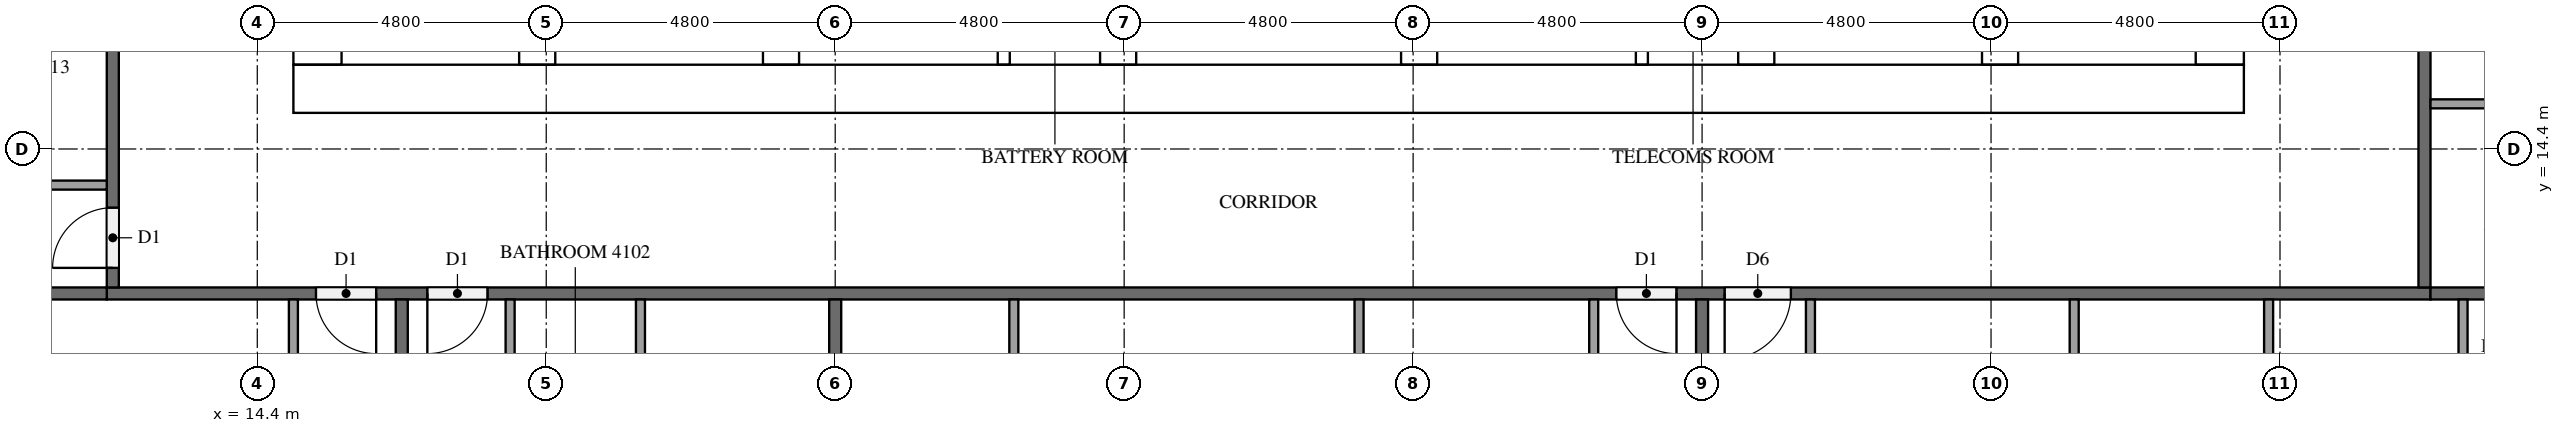
"""IFC4 building model, lengths in metres.
Left out: names, types, materials, properties, quantities, classifications, styles, units other than length and angle.
Written with IfcOpenShell. Run it as: python <this file> out.ifc"""

import sys

from ifc_helpers import new_model, si_unit, direction, frame, frame_2d, origin, place, context, subcontext, project, spatial, rectangle, extrude, element, fill, save


model = new_model("IFC4")
c1 = context("Model", 3, precision=1e-05, world=origin(), true_north=direction((0.0, 1.0)))
c2 = subcontext(c1, "Body", "Model", "MODEL_VIEW")
j1 = project(units=[si_unit("LENGTHUNIT", "METRE"), si_unit("PLANEANGLEUNIT", "RADIAN")], contexts=[c1])
p1 = place(None, origin())
s1 = spatial("IfcSite", under=j1, at=p1, CompositionType="ELEMENT")
p2 = place(p1, origin())
s2 = spatial("IfcBuilding", under=s1, at=p2, CompositionType="ELEMENT")
p3 = place(p2, frame((0.0, 0.0, 159.5)))
s3 = spatial("IfcBuildingStorey", under=s2, at=p3, CompositionType="ELEMENT", Elevation=159.5)
p4 = place(p3, frame((15.0, 15.4, 0.0), z_axis=(0.0, 0.0, 1.0), x_axis=(1.0, 0.0, 0.0)))
e1 = element("IfcWall", 1, at=p4, inside=s3, PredefinedType="SHEAR", context=c2, shape_type="SweptSolid", body=[
    extrude(rectangle(XDim=32.4, YDim=0.8, at=frame_2d((16.2, 0.0))), origin(), (0.0, 0.0, 1.0), 3.2),
])
p5 = place(p4, frame((15.3, 0.0, 0.0)))
e2 = element("IfcOpeningElement", 2, at=p5, cuts=e1, PredefinedType="OPENING", context=c2, shape_type="SweptSolid", body=[
    extrude(rectangle(XDim=1.8, YDim=2.1, at=frame_2d((0.9, 1.05))), frame((0.0, 0.41, 0.0), z_axis=(0.0, -1.0, 0.0), x_axis=(1.0, 0.0, 0.0)), (0.0, 0.0, 1.0), 0.82),
])
p6 = place(p3, frame((15.4, 15.8, 0.0), z_axis=(0.0, 0.0, 1.0), x_axis=(0.0, 1.0, 0.0)))
e3 = element("IfcWall", 3, at=p6, inside=s3, PredefinedType="SHEAR", context=c2, shape_type="SweptSolid", body=[
    extrude(rectangle(XDim=21.2, YDim=0.8, at=frame_2d((10.6, 0.0))), origin(), (0.0, 0.0, 1.0), 3.2),
])
p7 = place(p6, frame((4.96, 0.0, 0.0)))
e4 = element("IfcOpeningElement", 4, at=p7, cuts=e3, PredefinedType="OPENING", context=c2, shape_type="SweptSolid", body=[
    extrude(rectangle(XDim=1.2, YDim=2.1, at=frame_2d((0.6, 1.05))), frame((0.0, 0.41, 0.0), z_axis=(0.0, -1.0, 0.0), x_axis=(1.0, 0.0, 0.0)), (0.0, 0.0, 1.0), 0.82),
])
p8 = place(p3, frame((47.0, 15.8, 0.0), z_axis=(0.0, 0.0, 1.0), x_axis=(0.0, 1.0, 0.0)))
e5 = element("IfcWall", 5, at=p8, inside=s3, PredefinedType="SHEAR", context=c2, shape_type="SweptSolid", body=[
    extrude(rectangle(XDim=21.2, YDim=0.8, at=frame_2d((10.6, 0.0))), origin(), (0.0, 0.0, 1.0), 3.2),
])
p9 = place(p8, frame((10.3, 0.0, 0.0)))
e6 = element("IfcOpeningElement", 6, at=p9, cuts=e5, PredefinedType="OPENING", context=c2, shape_type="SweptSolid", body=[
    extrude(rectangle(XDim=1.2, YDim=2.1, at=frame_2d((0.6, 1.05))), frame((0.0, 0.41, 0.0), z_axis=(0.0, -1.0, 0.0), x_axis=(1.0, 0.0, 0.0)), (0.0, 0.0, 1.0), 0.82),
])
p10 = place(p3, frame((19.05, 15.8, 0.0), z_axis=(0.0, 0.0, 1.0), x_axis=(0.0, 1.0, 0.0)))
e7 = element("IfcWall", 7, at=p10, inside=s3, PredefinedType="SHEAR", context=c2, shape_type="SweptSolid", body=[
    extrude(rectangle(XDim=15.15, YDim=0.6, at=frame_2d((7.575, 0.0))), origin(), (0.0, 0.0, 1.0), 3.2),
])
p11 = place(p10, frame((9.65, 0.0, 0.0)))
e8 = element("IfcOpeningElement", 8, at=p11, cuts=e7, PredefinedType="OPENING", context=c2, shape_type="SweptSolid", body=[
    extrude(rectangle(XDim=1.1, YDim=2.1, at=frame_2d((0.55, 1.05))), frame((0.0, 0.31, 0.0), z_axis=(0.0, -1.0, 0.0), x_axis=(1.0, 0.0, 0.0)), (0.0, 0.0, 1.0), 0.62),
])
p12 = place(p10, frame((13.15, 0.0, 0.0)))
e9 = element("IfcOpeningElement", 9, at=p12, cuts=e7, PredefinedType="OPENING", context=c2, shape_type="SweptSolid", body=[
    extrude(rectangle(XDim=1.1, YDim=2.1, at=frame_2d((0.55, 1.05))), frame((0.0, 0.31, 0.0), z_axis=(0.0, -1.0, 0.0), x_axis=(1.0, 0.0, 0.0)), (0.0, 0.0, 1.0), 0.62),
])
p13 = place(p10, frame((0.4, 0.0, 0.0)))
e10 = element("IfcOpeningElement", 10, at=p13, cuts=e7, PredefinedType="OPENING", context=c2, shape_type="SweptSolid", body=[
    extrude(rectangle(XDim=1.2, YDim=2.1, at=frame_2d((0.6, 1.05))), frame((0.0, 0.31, 0.0), z_axis=(0.0, -1.0, 0.0), x_axis=(1.0, 0.0, 0.0)), (0.0, 0.0, 1.0), 0.62),
])
p14 = place(p3, frame((23.1, 15.8, 0.0), z_axis=(0.0, 0.0, 1.0), x_axis=(0.0, 1.0, 0.0)))
e11 = element("IfcWall", 11, at=p14, inside=s3, PredefinedType="SHEAR", context=c2, shape_type="SweptSolid", body=[
    extrude(rectangle(XDim=21.2, YDim=0.6, at=frame_2d((10.6, 0.0))), origin(), (0.0, 0.0, 1.0), 3.2),
])
p15 = place(p3, frame((39.3, 15.8, 0.0), z_axis=(0.0, 0.0, 1.0), x_axis=(0.0, 1.0, 0.0)))
e12 = element("IfcWall", 12, at=p15, inside=s3, PredefinedType="SHEAR", context=c2, shape_type="SweptSolid", body=[
    extrude(rectangle(XDim=8.45, YDim=0.6, at=frame_2d((4.225, 0.0))), origin(), (0.0, 0.0, 1.0), 3.2),
])
p16 = place(p3, frame((43.35, 15.8, 0.0), z_axis=(0.0, 0.0, 1.0), x_axis=(0.0, 1.0, 0.0)))
e13 = element("IfcWall", 13, at=p16, inside=s3, PredefinedType="SHEAR", context=c2, shape_type="SweptSolid", body=[
    extrude(rectangle(XDim=8.45, YDim=0.6, at=frame_2d((4.225, 0.0))), origin(), (0.0, 0.0, 1.0), 3.2),
])
p17 = place(p16, frame((0.4, 0.0, 0.0)))
e14 = element("IfcOpeningElement", 14, at=p17, cuts=e13, PredefinedType="OPENING", context=c2, shape_type="SweptSolid", body=[
    extrude(rectangle(XDim=1.2, YDim=2.1, at=frame_2d((0.6, 1.05))), frame((0.0, 0.31, 0.0), z_axis=(0.0, -1.0, 0.0), x_axis=(1.0, 0.0, 0.0)), (0.0, 0.0, 1.0), 0.62),
])
for number, where, z_axis, x_axis in (
    (15, (28.7, 15.8, 0.0), (0.0, 0.0, 1.0), (0.0, 1.0, 0.0)),
    (16, (33.7, 15.8, 0.0), (0.0, 0.0, 1.0), (0.0, 1.0, 0.0)),
):
    element("IfcWall", number, at=place(p3, frame(where, z_axis=z_axis, x_axis=x_axis)), inside=s3, PredefinedType="SHEAR", context=c2, shape_type="SweptSolid", body=[
        extrude(rectangle(XDim=2.65, YDim=0.6, at=frame_2d((1.325, 0.0))), origin(), (0.0, 0.0, 1.0), 3.2),
    ])
for number, where, z_axis, x_axis in (
    (17, (26.8, 15.8, 0.0), (0.0, 0.0, 1.0), (0.0, 1.0, 0.0)),
    (18, (37.4, 15.8, 0.0), (0.0, 0.0, 1.0), (0.0, 1.0, 0.0)),
):
    element("IfcWall", number, at=place(p3, frame(where, z_axis=z_axis, x_axis=x_axis)), inside=s3, PredefinedType="PARTITIONING", context=c2, shape_type="SweptSolid", body=[
        extrude(rectangle(XDim=2.65, YDim=0.2, at=frame_2d((1.325, 0.0))), origin(), (0.0, 0.0, 1.0), 3.2),
    ])
p18 = place(p3, frame((50.5, 12.0, 0.0), z_axis=(0.0, 0.0, 1.0), x_axis=(-1.0, 0.0, 0.0)))
e19 = element("IfcWall", 19, at=p18, inside=s3, PredefinedType="PARTITIONING", context=c2, shape_type="SweptSolid", body=[
    extrude(rectangle(XDim=38.6, YDim=0.2, at=frame_2d((19.3, 0.0))), origin(), (0.0, 0.0, 1.0), 3.2),
])
p19 = place(p18, frame((34.125, 0.0, 0.0)))
e20 = element("IfcOpeningElement", 20, at=p19, cuts=e19, PredefinedType="OPENING", context=c2, shape_type="SweptSolid", body=[
    extrude(rectangle(XDim=1.0, YDim=2.1, at=frame_2d((0.5, 1.05))), frame((0.0, 0.11, 0.0), z_axis=(0.0, -1.0, 0.0), x_axis=(1.0, 0.0, 0.0)), (0.0, 0.0, 1.0), 0.22),
])
p20 = place(p18, frame((32.275, 0.0, 0.0)))
e21 = element("IfcOpeningElement", 21, at=p20, cuts=e19, PredefinedType="OPENING", context=c2, shape_type="SweptSolid", body=[
    extrude(rectangle(XDim=1.0, YDim=2.1, at=frame_2d((0.5, 1.05))), frame((0.0, 0.11, 0.0), z_axis=(0.0, -1.0, 0.0), x_axis=(1.0, 0.0, 0.0)), (0.0, 0.0, 1.0), 0.22),
])
p21 = place(p18, frame((12.525, 0.0, 0.0)))
e22 = element("IfcOpeningElement", 22, at=p21, cuts=e19, PredefinedType="OPENING", context=c2, shape_type="SweptSolid", body=[
    extrude(rectangle(XDim=1.0, YDim=2.1, at=frame_2d((0.5, 1.05))), frame((0.0, 0.11, 0.0), z_axis=(0.0, -1.0, 0.0), x_axis=(1.0, 0.0, 0.0)), (0.0, 0.0, 1.0), 0.22),
])
p22 = place(p18, frame((10.625, 0.0, 0.0)))
e23 = element("IfcOpeningElement", 23, at=p22, cuts=e19, PredefinedType="OPENING", context=c2, shape_type="SweptSolid", body=[
    extrude(rectangle(XDim=1.1, YDim=2.1, at=frame_2d((0.55, 1.05))), frame((0.0, 0.11, 0.0), z_axis=(0.0, -1.0, 0.0), x_axis=(1.0, 0.0, 0.0)), (0.0, 0.0, 1.0), 0.22),
])
p23 = place(p3, frame((50.4, 40.7, 0.0), z_axis=(0.0, 0.0, 1.0), x_axis=(0.0, -1.0, 0.0)))
e24 = element("IfcWall", 24, at=p23, inside=s3, PredefinedType="PARTITIONING", context=c2, shape_type="SweptSolid", body=[
    extrude(rectangle(XDim=28.6, YDim=0.2, at=frame_2d((14.3, 0.0))), origin(), (0.0, 0.0, 1.0), 3.2),
])
p24 = place(p23, frame((19.525, 0.0, 0.0)))
e25 = element("IfcOpeningElement", 25, at=p24, cuts=e24, PredefinedType="OPENING", context=c2, shape_type="SweptSolid", body=[
    extrude(rectangle(XDim=1.0, YDim=2.1, at=frame_2d((0.5, 1.05))), frame((0.0, 0.11, 0.0), z_axis=(0.0, -1.0, 0.0), x_axis=(1.0, 0.0, 0.0)), (0.0, 0.0, 1.0), 0.22),
])
p25 = place(p23, frame((17.675, 0.0, 0.0)))
e26 = element("IfcOpeningElement", 26, at=p25, cuts=e24, PredefinedType="OPENING", context=c2, shape_type="SweptSolid", body=[
    extrude(rectangle(XDim=1.0, YDim=2.1, at=frame_2d((0.5, 1.05))), frame((0.0, 0.11, 0.0), z_axis=(0.0, -1.0, 0.0), x_axis=(1.0, 0.0, 0.0)), (0.0, 0.0, 1.0), 0.22),
])
p26 = place(p23, frame((8.075, 0.0, 0.0)))
e27 = element("IfcOpeningElement", 27, at=p26, cuts=e24, PredefinedType="OPENING", context=c2, shape_type="SweptSolid", body=[
    extrude(rectangle(XDim=1.0, YDim=2.1, at=frame_2d((0.5, 1.05))), frame((0.0, 0.11, 0.0), z_axis=(0.0, -1.0, 0.0), x_axis=(1.0, 0.0, 0.0)), (0.0, 0.0, 1.0), 0.22),
])
p27 = place(p3, frame((12.0, 12.1, 0.0), z_axis=(0.0, 0.0, 1.0), x_axis=(0.0, 1.0, 0.0)))
e28 = element("IfcWall", 28, at=p27, inside=s3, PredefinedType="PARTITIONING", context=c2, shape_type="SweptSolid", body=[
    extrude(rectangle(XDim=28.6, YDim=0.2, at=frame_2d((14.3, 0.0))), origin(), (0.0, 0.0, 1.0), 3.2),
])
p28 = place(p27, frame((24.325, 0.0, 0.0)))
e29 = element("IfcOpeningElement", 29, at=p28, cuts=e28, PredefinedType="OPENING", context=c2, shape_type="SweptSolid", body=[
    extrude(rectangle(XDim=1.0, YDim=2.1, at=frame_2d((0.5, 1.05))), frame((0.0, 0.11, 0.0), z_axis=(0.0, -1.0, 0.0), x_axis=(1.0, 0.0, 0.0)), (0.0, 0.0, 1.0), 0.22),
])
p29 = place(p27, frame((22.475, 0.0, 0.0)))
e30 = element("IfcOpeningElement", 30, at=p29, cuts=e28, PredefinedType="OPENING", context=c2, shape_type="SweptSolid", body=[
    extrude(rectangle(XDim=1.0, YDim=2.1, at=frame_2d((0.5, 1.05))), frame((0.0, 0.11, 0.0), z_axis=(0.0, -1.0, 0.0), x_axis=(1.0, 0.0, 0.0)), (0.0, 0.0, 1.0), 0.22),
])
p30 = place(p27, frame((0.325, 0.0, 0.0)))
e31 = element("IfcOpeningElement", 31, at=p30, cuts=e28, PredefinedType="OPENING", context=c2, shape_type="SweptSolid", body=[
    extrude(rectangle(XDim=1.0, YDim=2.1, at=frame_2d((0.5, 1.05))), frame((0.0, 0.11, 0.0), z_axis=(0.0, -1.0, 0.0), x_axis=(1.0, 0.0, 0.0)), (0.0, 0.0, 1.0), 0.22),
])
for number, where, z_axis, x_axis in (
    (32, (16.8, 11.9, 0.0), (0.0, 0.0, 1.0), (0.0, -1.0, 0.0)),
    (33, (0.1, 12.0, 0.0), (0.0, 0.0, 1.0), (1.0, 0.0, 0.0)),
):
    element("IfcWall", number, at=place(p3, frame(where, z_axis=z_axis, x_axis=x_axis)), inside=s3, PredefinedType="PARTITIONING", context=c2, shape_type="SweptSolid", body=[
        extrude(rectangle(XDim=11.8, YDim=0.2, at=frame_2d((5.9, 0.0))), origin(), (0.0, 0.0, 1.0), 3.2),
    ])
p31 = place(p3, frame((24.0, 11.9, 0.0), z_axis=(0.0, 0.0, 1.0), x_axis=(0.0, -1.0, 0.0)))
e34 = element("IfcWall", 34, at=p31, inside=s3, PredefinedType="PARTITIONING", context=c2, shape_type="SweptSolid", body=[
    extrude(rectangle(XDim=11.525, YDim=0.2, at=frame_2d((5.762, 0.0))), origin(), (0.0, 0.0, 1.0), 3.2),
])
p32 = place(p3, frame((38.4, 11.9, 0.0), z_axis=(0.0, 0.0, 1.0), x_axis=(0.0, -1.0, 0.0)))
e35 = element("IfcWall", 35, at=p32, inside=s3, PredefinedType="PARTITIONING", context=c2, shape_type="SweptSolid", body=[
    extrude(rectangle(XDim=11.8, YDim=0.2, at=frame_2d((5.9, 0.0))), origin(), (0.0, 0.0, 1.0), 3.2),
])
p33 = place(p3, frame((50.5, 12.0, 0.0), z_axis=(0.0, 0.0, 1.0), x_axis=(1.0, 0.0, 0.0)))
e36 = element("IfcWall", 36, at=p33, inside=s3, PredefinedType="PARTITIONING", context=c2, shape_type="SweptSolid", body=[
    extrude(rectangle(XDim=7.0, YDim=0.2, at=frame_2d((3.5, 0.0))), origin(), (0.0, 0.0, 1.0), 3.2),
])
p34 = place(p3, frame((15.0, 11.9, 0.0), z_axis=(0.0, 0.0, 1.0), x_axis=(0.0, -1.0, 0.0)))
e37 = element("IfcWall", 37, at=p34, inside=s3, PredefinedType="PARTITIONING", context=c2, shape_type="SweptSolid", body=[
    extrude(rectangle(XDim=3.125, YDim=0.15, at=frame_2d((1.562, 0.0))), origin(), (0.0, 0.0, 1.0), 3.2),
])
p35 = place(p3, frame((20.765, 11.9, 0.0), z_axis=(0.0, 0.0, 1.0), x_axis=(0.0, -1.0, 0.0)))
e38 = element("IfcWall", 38, at=p35, inside=s3, PredefinedType="PARTITIONING", context=c2, shape_type="SweptSolid", body=[
    extrude(rectangle(XDim=2.975, YDim=0.15, at=frame_2d((1.487, 0.0))), origin(), (0.0, 0.0, 1.0), 3.2),
])
for number, where, z_axis, x_axis in (
    (39, (18.6, 11.9, 0.0), (0.0, 0.0, 1.0), (0.0, -1.0, 0.0)),
    (40, (32.702, 11.9, 0.0), (0.0, 0.0, 1.0), (0.0, -1.0, 0.0)),
    (41, (26.967, 11.9, 0.0), (0.0, 0.0, 1.0), (0.0, -1.0, 0.0)),
):
    element("IfcWall", number, at=place(p3, frame(where, z_axis=z_axis, x_axis=x_axis)), inside=s3, PredefinedType="PARTITIONING", context=c2, shape_type="SweptSolid", body=[
        extrude(rectangle(XDim=3.125, YDim=0.15, at=frame_2d((1.562, 0.0))), origin(), (0.0, 0.0, 1.0), 3.2),
    ])
p36 = place(p3, frame((36.6, 11.9, 0.0), z_axis=(0.0, 0.0, 1.0), x_axis=(0.0, -1.0, 0.0)))
e42 = element("IfcWall", 42, at=p36, inside=s3, PredefinedType="PARTITIONING", context=c2, shape_type="SweptSolid", body=[
    extrude(rectangle(XDim=3.275, YDim=0.15, at=frame_2d((1.637, 0.0))), origin(), (0.0, 0.0, 1.0), 3.2),
])
for number, where, z_axis, x_axis in (
    (43, (44.581, 11.9, 0.0), (0.0, 0.0, 1.0), (0.0, -1.0, 0.0)),
    (44, (47.811, 11.9, 0.0), (0.0, 0.0, 1.0), (0.0, -1.0, 0.0)),
    (45, (51.041, 11.9, 0.0), (0.0, 0.0, 1.0), (0.0, -1.0, 0.0)),
):
    element("IfcWall", number, at=place(p3, frame(where, z_axis=z_axis, x_axis=x_axis)), inside=s3, PredefinedType="PARTITIONING", context=c2, shape_type="SweptSolid", body=[
        extrude(rectangle(XDim=4.175, YDim=0.15, at=frame_2d((2.087, 0.0))), origin(), (0.0, 0.0, 1.0), 3.2),
    ])
p37 = place(p3, frame((40.2, 11.9, 0.0), z_axis=(0.0, 0.0, 1.0), x_axis=(0.0, -1.0, 0.0)))
e46 = element("IfcWall", 46, at=p37, inside=s3, PredefinedType="PARTITIONING", context=c2, shape_type="SweptSolid", body=[
    extrude(rectangle(XDim=4.325, YDim=0.15, at=frame_2d((2.163, 0.0))), origin(), (0.0, 0.0, 1.0), 3.2),
])
p38 = place(p3, frame((50.5, 15.15, 0.0), z_axis=(0.0, 0.0, 1.0), x_axis=(1.0, 0.0, 0.0)))
e47 = element("IfcWall", 47, at=p38, inside=s3, PredefinedType="PARTITIONING", context=c2, shape_type="SweptSolid", body=[
    extrude(rectangle(XDim=1.925, YDim=0.15, at=frame_2d((0.962, 0.0))), origin(), (0.0, 0.0, 1.0), 3.2),
])
p39 = place(p3, frame((11.9, 13.8, 0.0), z_axis=(0.0, 0.0, 1.0), x_axis=(-1.0, 0.0, 0.0)))
e48 = element("IfcWall", 48, at=p39, inside=s3, PredefinedType="PARTITIONING", context=c2, shape_type="SweptSolid", body=[
    extrude(rectangle(XDim=3.875, YDim=0.15, at=frame_2d((1.938, 0.0))), origin(), (0.0, 0.0, 1.0), 3.2),
])
p40 = place(p5, frame((1.8, 0.0, 0.0), z_axis=(0.0, 0.0, 1.0), x_axis=(-1.0, 0.0, 0.0)))
e49 = element("IfcDoor", 49, at=p40, inside=s3, OperationType="DOUBLE_DOOR_SINGLE_SWING", PredefinedType="DOOR", context=c2, shape_type="SweptSolid", body=[
    extrude(rectangle(XDim=1.8, YDim=2.1, at=frame_2d((0.9, 1.05))), frame((0.0, 0.025, 0.0), z_axis=(0.0, -1.0, 0.0), x_axis=(1.0, 0.0, 0.0)), (0.0, 0.0, 1.0), 0.05),
])
fill(e2, e49)
p41 = place(p19, origin())
e50 = element("IfcDoor", 50, at=p41, inside=s3, OperationType="SINGLE_SWING_LEFT", PredefinedType="DOOR", context=c2, shape_type="SweptSolid", body=[
    extrude(rectangle(XDim=1.0, YDim=2.1, at=frame_2d((0.5, 1.05))), frame((0.0, 0.025, 0.0), z_axis=(0.0, -1.0, 0.0), x_axis=(1.0, 0.0, 0.0)), (0.0, 0.0, 1.0), 0.05),
])
fill(e20, e50)
p42 = place(p20, origin())
e51 = element("IfcDoor", 51, at=p42, inside=s3, OperationType="SINGLE_SWING_RIGHT", PredefinedType="DOOR", context=c2, shape_type="SweptSolid", body=[
    extrude(rectangle(XDim=1.0, YDim=2.1, at=frame_2d((0.5, 1.05))), frame((0.0, 0.025, 0.0), z_axis=(0.0, -1.0, 0.0), x_axis=(1.0, 0.0, 0.0)), (0.0, 0.0, 1.0), 0.05),
])
fill(e21, e51)
p43 = place(p21, origin())
e52 = element("IfcDoor", 52, at=p43, inside=s3, OperationType="SINGLE_SWING_LEFT", PredefinedType="DOOR", context=c2, shape_type="SweptSolid", body=[
    extrude(rectangle(XDim=1.0, YDim=2.1, at=frame_2d((0.5, 1.05))), frame((0.0, 0.025, 0.0), z_axis=(0.0, -1.0, 0.0), x_axis=(1.0, 0.0, 0.0)), (0.0, 0.0, 1.0), 0.05),
])
fill(e22, e52)
p44 = place(p22, origin())
e53 = element("IfcDoor", 53, at=p44, inside=s3, OperationType="SINGLE_SWING_RIGHT", PredefinedType="DOOR", context=c2, shape_type="SweptSolid", body=[
    extrude(rectangle(XDim=1.1, YDim=2.1, at=frame_2d((0.55, 1.05))), frame((0.0, 0.025, 0.0), z_axis=(0.0, -1.0, 0.0), x_axis=(1.0, 0.0, 0.0)), (0.0, 0.0, 1.0), 0.05),
])
fill(e23, e53)
p45 = place(p30, origin())
e54 = element("IfcDoor", 54, at=p45, inside=s3, OperationType="SINGLE_SWING_LEFT", PredefinedType="DOOR", context=c2, shape_type="SweptSolid", body=[
    extrude(rectangle(XDim=1.0, YDim=2.1, at=frame_2d((0.5, 1.05))), frame((0.0, 0.025, 0.0), z_axis=(0.0, -1.0, 0.0), x_axis=(1.0, 0.0, 0.0)), (0.0, 0.0, 1.0), 0.05),
])
fill(e31, e54)
save(model, sys.argv[1])
